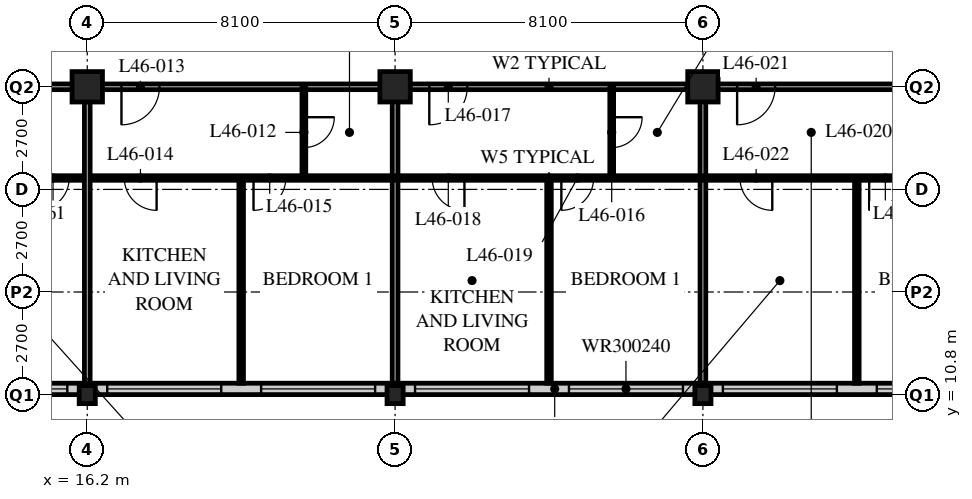
"""IFC4 building model, lengths in metres.
Left out: names, types, materials, properties, quantities, classifications, styles, units other than length and angle.
Written with IfcOpenShell. Run it as: python <this file> out.ifc"""

import sys

from ifc_helpers import new_model, si_unit, direction, frame, frame_2d, origin, origin_2d, place, context, subcontext, project, spatial, rectangle, hollow_rectangle, i_section, extrude, element, fill, save


model = new_model("IFC4")
c1 = context("Model", 3, precision=1e-05, world=origin(), true_north=direction((0.0, 1.0)))
c2 = subcontext(c1, "Body", "Model", "MODEL_VIEW")
j1 = project(units=[si_unit("LENGTHUNIT", "METRE"), si_unit("PLANEANGLEUNIT", "RADIAN")], contexts=[c1])
p1 = place(None, origin())
s1 = spatial("IfcSite", under=j1, at=p1, CompositionType="ELEMENT")
p2 = place(p1, origin())
s2 = spatial("IfcBuilding", under=s1, at=p2, CompositionType="ELEMENT")
p3 = place(p2, frame((0.0, 0.0, 181.2)))
s3 = spatial("IfcBuildingStorey", under=s2, at=p3, CompositionType="ELEMENT", Elevation=181.2)
p4 = place(p3, frame((16.2, 10.8, 0.0), z_axis=(0.0, 0.0, 1.0), x_axis=(1.0, 0.0, 0.0)))
e1 = element("IfcColumn", 1, at=p4, inside=s3, PredefinedType="COLUMN", context=c2, shape_type="SweptSolid", body=[
    extrude(i_section(OverallWidth=0.424, OverallDepth=0.475, WebThickness=0.048, FlangeThickness=0.077, FilletRadius=0.015, at=origin_2d()), origin(), (0.0, 0.0, 1.0), 3.6),
])
p5 = place(p3, frame((16.2, 18.9, 0.0), z_axis=(0.0, 0.0, 1.0), x_axis=(1.0, 0.0, 0.0)))
e2 = element("IfcColumn", 2, at=p5, inside=s3, PredefinedType="COLUMN", context=c2, shape_type="SweptSolid", body=[
    extrude(hollow_rectangle(XDim=0.8, YDim=0.8, WallThickness=0.08, at=origin_2d()), origin(), (0.0, 0.0, 1.0), 3.6),
])
p6 = place(p3, frame((24.3, 10.8, 0.0), z_axis=(0.0, 0.0, 1.0), x_axis=(1.0, 0.0, 0.0)))
e3 = element("IfcColumn", 3, at=p6, inside=s3, PredefinedType="COLUMN", context=c2, shape_type="SweptSolid", body=[
    extrude(i_section(OverallWidth=0.424, OverallDepth=0.475, WebThickness=0.048, FlangeThickness=0.077, FilletRadius=0.015, at=origin_2d()), origin(), (0.0, 0.0, 1.0), 3.6),
])
p7 = place(p3, frame((24.3, 18.9, 0.0), z_axis=(0.0, 0.0, 1.0), x_axis=(1.0, 0.0, 0.0)))
e4 = element("IfcColumn", 4, at=p7, inside=s3, PredefinedType="COLUMN", context=c2, shape_type="SweptSolid", body=[
    extrude(hollow_rectangle(XDim=0.8, YDim=0.8, WallThickness=0.08, at=origin_2d()), origin(), (0.0, 0.0, 1.0), 3.6),
])
p8 = place(p3, frame((32.4, 10.8, 0.0), z_axis=(0.0, 0.0, 1.0), x_axis=(1.0, 0.0, 0.0)))
e5 = element("IfcColumn", 5, at=p8, inside=s3, PredefinedType="COLUMN", context=c2, shape_type="SweptSolid", body=[
    extrude(i_section(OverallWidth=0.424, OverallDepth=0.475, WebThickness=0.048, FlangeThickness=0.077, FilletRadius=0.015, at=origin_2d()), origin(), (0.0, 0.0, 1.0), 3.6),
])
p9 = place(p3, frame((32.4, 18.9, 0.0), z_axis=(0.0, 0.0, 1.0), x_axis=(1.0, 0.0, 0.0)))
e6 = element("IfcColumn", 6, at=p9, inside=s3, PredefinedType="COLUMN", context=c2, shape_type="SweptSolid", body=[
    extrude(hollow_rectangle(XDim=0.8, YDim=0.8, WallThickness=0.08, at=origin_2d()), origin(), (0.0, 0.0, 1.0), 3.6),
])
p10 = place(p3, frame((8.4, 10.95, 0.0), z_axis=(0.0, 0.0, 1.0), x_axis=(1.0, 0.0, 0.0)))
e7 = element("IfcWall", 7, at=p10, inside=s3, PredefinedType="SOLIDWALL", context=c2, shape_type="SweptSolid", body=[
    extrude(rectangle(XDim=40.2, YDim=0.3, at=frame_2d((20.1, 0.0))), origin(), (0.0, 0.0, 1.0), 3.39),
])
p11 = place(p10, frame((0.225, 0.0, 0.6)))
e8 = element("IfcOpeningElement", 8, at=p11, cuts=e7, PredefinedType="OPENING", context=c2, shape_type="SweptSolid", body=[
    extrude(rectangle(XDim=3.0, YDim=2.4, at=frame_2d((1.5, 1.2))), frame((0.0, 0.16, 0.0), z_axis=(0.0, -1.0, 0.0), x_axis=(1.0, 0.0, 0.0)), (0.0, 0.0, 1.0), 0.32),
])
p12 = place(p10, frame((4.275, 0.0, 0.6)))
e9 = element("IfcOpeningElement", 9, at=p12, cuts=e7, PredefinedType="OPENING", context=c2, shape_type="SweptSolid", body=[
    extrude(rectangle(XDim=3.0, YDim=2.4, at=frame_2d((1.5, 1.2))), frame((0.0, 0.16, 0.0), z_axis=(0.0, -1.0, 0.0), x_axis=(1.0, 0.0, 0.0)), (0.0, 0.0, 1.0), 0.32),
])
p13 = place(p10, frame((8.325, 0.0, 0.6)))
e10 = element("IfcOpeningElement", 10, at=p13, cuts=e7, PredefinedType="OPENING", context=c2, shape_type="SweptSolid", body=[
    extrude(rectangle(XDim=3.0, YDim=2.4, at=frame_2d((1.5, 1.2))), frame((0.0, 0.16, 0.0), z_axis=(0.0, -1.0, 0.0), x_axis=(1.0, 0.0, 0.0)), (0.0, 0.0, 1.0), 0.32),
])
p14 = place(p10, frame((12.375, 0.0, 0.6)))
e11 = element("IfcOpeningElement", 11, at=p14, cuts=e7, PredefinedType="OPENING", context=c2, shape_type="SweptSolid", body=[
    extrude(rectangle(XDim=3.0, YDim=2.4, at=frame_2d((1.5, 1.2))), frame((0.0, 0.16, 0.0), z_axis=(0.0, -1.0, 0.0), x_axis=(1.0, 0.0, 0.0)), (0.0, 0.0, 1.0), 0.32),
])
p15 = place(p10, frame((16.425, 0.0, 0.6)))
e12 = element("IfcOpeningElement", 12, at=p15, cuts=e7, PredefinedType="OPENING", context=c2, shape_type="SweptSolid", body=[
    extrude(rectangle(XDim=3.0, YDim=2.4, at=frame_2d((1.5, 1.2))), frame((0.0, 0.16, 0.0), z_axis=(0.0, -1.0, 0.0), x_axis=(1.0, 0.0, 0.0)), (0.0, 0.0, 1.0), 0.32),
])
p16 = place(p10, frame((20.475, 0.0, 0.6)))
e13 = element("IfcOpeningElement", 13, at=p16, cuts=e7, PredefinedType="OPENING", context=c2, shape_type="SweptSolid", body=[
    extrude(rectangle(XDim=3.0, YDim=2.4, at=frame_2d((1.5, 1.2))), frame((0.0, 0.16, 0.0), z_axis=(0.0, -1.0, 0.0), x_axis=(1.0, 0.0, 0.0)), (0.0, 0.0, 1.0), 0.32),
])
p17 = place(p10, frame((24.525, 0.0, 0.6)))
e14 = element("IfcOpeningElement", 14, at=p17, cuts=e7, PredefinedType="OPENING", context=c2, shape_type="SweptSolid", body=[
    extrude(rectangle(XDim=3.0, YDim=2.4, at=frame_2d((1.5, 1.2))), frame((0.0, 0.16, 0.0), z_axis=(0.0, -1.0, 0.0), x_axis=(1.0, 0.0, 0.0)), (0.0, 0.0, 1.0), 0.32),
])
p18 = place(p10, frame((28.575, 0.0, 0.6)))
e15 = element("IfcOpeningElement", 15, at=p18, cuts=e7, PredefinedType="OPENING", context=c2, shape_type="SweptSolid", body=[
    extrude(rectangle(XDim=3.0, YDim=2.4, at=frame_2d((1.5, 1.2))), frame((0.0, 0.16, 0.0), z_axis=(0.0, -1.0, 0.0), x_axis=(1.0, 0.0, 0.0)), (0.0, 0.0, 1.0), 0.32),
])
p19 = place(p10, frame((32.625, 0.0, 0.6)))
e16 = element("IfcOpeningElement", 16, at=p19, cuts=e7, PredefinedType="OPENING", context=c2, shape_type="SweptSolid", body=[
    extrude(rectangle(XDim=3.0, YDim=2.4, at=frame_2d((1.5, 1.2))), frame((0.0, 0.16, 0.0), z_axis=(0.0, -1.0, 0.0), x_axis=(1.0, 0.0, 0.0)), (0.0, 0.0, 1.0), 0.32),
])
p20 = place(p10, frame((36.675, 0.0, 0.6)))
e17 = element("IfcOpeningElement", 17, at=p20, cuts=e7, PredefinedType="OPENING", context=c2, shape_type="SweptSolid", body=[
    extrude(rectangle(XDim=3.0, YDim=2.4, at=frame_2d((1.5, 1.2))), frame((0.0, 0.16, 0.0), z_axis=(0.0, -1.0, 0.0), x_axis=(1.0, 0.0, 0.0)), (0.0, 0.0, 1.0), 0.32),
])
p21 = place(p3, frame((12.15, 18.9, 0.0), z_axis=(0.0, 0.0, 1.0), x_axis=(1.0, 0.0, 0.0)))
e18 = element("IfcWall", 18, at=p21, inside=s3, PredefinedType="PARTITIONING", context=c2, shape_type="SweptSolid", body=[
    extrude(rectangle(XDim=32.4, YDim=0.15, at=frame_2d((16.2, 0.0))), origin(), (0.0, 0.0, 1.0), 2.778),
])
p22 = place(p21, frame((4.95, 0.0, 0.0)))
e19 = element("IfcOpeningElement", 19, at=p22, cuts=e18, PredefinedType="OPENING", context=c2, shape_type="SweptSolid", body=[
    extrude(rectangle(XDim=1.0, YDim=2.1, at=frame_2d((0.5, 1.05))), frame((0.0, 0.085, 0.0), z_axis=(0.0, -1.0, 0.0), x_axis=(1.0, 0.0, 0.0)), (0.0, 0.0, 1.0), 0.17),
])
p23 = place(p21, frame((13.05, 0.0, 0.0)))
e20 = element("IfcOpeningElement", 20, at=p23, cuts=e18, PredefinedType="OPENING", context=c2, shape_type="SweptSolid", body=[
    extrude(rectangle(XDim=1.0, YDim=2.1, at=frame_2d((0.5, 1.05))), frame((0.0, 0.085, 0.0), z_axis=(0.0, -1.0, 0.0), x_axis=(1.0, 0.0, 0.0)), (0.0, 0.0, 1.0), 0.17),
])
p24 = place(p21, frame((21.15, 0.0, 0.0)))
e21 = element("IfcOpeningElement", 21, at=p24, cuts=e18, PredefinedType="OPENING", context=c2, shape_type="SweptSolid", body=[
    extrude(rectangle(XDim=1.0, YDim=2.1, at=frame_2d((0.5, 1.05))), frame((0.0, 0.085, 0.0), z_axis=(0.0, -1.0, 0.0), x_axis=(1.0, 0.0, 0.0)), (0.0, 0.0, 1.0), 0.17),
])
p25 = place(p21, frame((1.525, 0.0, 0.0)))
e22 = element("IfcOpeningElement", 22, at=p25, cuts=e18, PredefinedType="OPENING", context=c2, shape_type="SweptSolid", body=[
    extrude(rectangle(XDim=1.0, YDim=2.1, at=frame_2d((0.5, 1.05))), frame((0.0, 0.085, 0.0), z_axis=(0.0, -1.0, 0.0), x_axis=(1.0, 0.0, 0.0)), (0.0, 0.0, 1.0), 0.17),
])
p26 = place(p21, frame((29.875, 0.0, 0.0)))
e23 = element("IfcOpeningElement", 23, at=p26, cuts=e18, PredefinedType="OPENING", context=c2, shape_type="SweptSolid", body=[
    extrude(rectangle(XDim=1.0, YDim=2.1, at=frame_2d((0.5, 1.05))), frame((0.0, 0.085, 0.0), z_axis=(0.0, -1.0, 0.0), x_axis=(1.0, 0.0, 0.0)), (0.0, 0.0, 1.0), 0.17),
])
p27 = place(p3, frame((21.9, 18.9, 0.0), z_axis=(0.0, 0.0, 1.0), x_axis=(0.0, -1.0, 0.0)))
e24 = element("IfcWall", 24, at=p27, inside=s3, PredefinedType="PARTITIONING", context=c2, shape_type="SweptSolid", body=[
    extrude(rectangle(XDim=2.4, YDim=0.1, at=frame_2d((1.2, 0.0))), origin(), (0.0, 0.0, 1.0), 3.39),
])
p28 = place(p27, frame((0.8, 0.0, 0.0)))
e25 = element("IfcOpeningElement", 25, at=p28, cuts=e24, PredefinedType="OPENING", context=c2, shape_type="SweptSolid", body=[
    extrude(rectangle(XDim=0.8, YDim=2.1, at=frame_2d((0.4, 1.05))), frame((0.0, 0.06, 0.0), z_axis=(0.0, -1.0, 0.0), x_axis=(1.0, 0.0, 0.0)), (0.0, 0.0, 1.0), 0.12),
])
p29 = place(p3, frame((20.25, 16.5, 0.0), z_axis=(0.0, 0.0, 1.0), x_axis=(0.0, -1.0, 0.0)))
e26 = element("IfcWall", 26, at=p29, inside=s3, PredefinedType="PARTITIONING", context=c2, shape_type="SweptSolid", body=[
    extrude(rectangle(XDim=5.4, YDim=0.12, at=frame_2d((2.7, 0.0))), origin(), (0.0, 0.0, 1.0), 3.39),
])
p30 = place(p3, frame((24.3, 18.9, 0.0), z_axis=(0.0, 0.0, 1.0), x_axis=(0.0, -1.0, 0.0)))
e27 = element("IfcWall", 27, at=p30, inside=s3, PredefinedType="PARTITIONING", context=c2, shape_type="SweptSolid", body=[
    extrude(rectangle(XDim=7.8, YDim=0.15, at=frame_2d((3.9, 0.0))), origin(), (0.0, 0.0, 1.0), 2.778),
])
p31 = place(p3, frame((30.0, 18.9, 0.0), z_axis=(0.0, 0.0, 1.0), x_axis=(0.0, -1.0, 0.0)))
e28 = element("IfcWall", 28, at=p31, inside=s3, PredefinedType="PARTITIONING", context=c2, shape_type="SweptSolid", body=[
    extrude(rectangle(XDim=2.4, YDim=0.1, at=frame_2d((1.2, 0.0))), origin(), (0.0, 0.0, 1.0), 3.39),
])
p32 = place(p31, frame((0.8, 0.0, 0.0)))
e29 = element("IfcOpeningElement", 29, at=p32, cuts=e28, PredefinedType="OPENING", context=c2, shape_type="SweptSolid", body=[
    extrude(rectangle(XDim=0.8, YDim=2.1, at=frame_2d((0.4, 1.05))), frame((0.0, 0.06, 0.0), z_axis=(0.0, -1.0, 0.0), x_axis=(1.0, 0.0, 0.0)), (0.0, 0.0, 1.0), 0.12),
])
p33 = place(p3, frame((28.35, 16.5, 0.0), z_axis=(0.0, 0.0, 1.0), x_axis=(0.0, -1.0, 0.0)))
e30 = element("IfcWall", 30, at=p33, inside=s3, PredefinedType="PARTITIONING", context=c2, shape_type="SweptSolid", body=[
    extrude(rectangle(XDim=5.4, YDim=0.12, at=frame_2d((2.7, 0.0))), origin(), (0.0, 0.0, 1.0), 3.39),
])
p34 = place(p3, frame((32.4, 18.9, 0.0), z_axis=(0.0, 0.0, 1.0), x_axis=(0.0, -1.0, 0.0)))
e31 = element("IfcWall", 31, at=p34, inside=s3, PredefinedType="PARTITIONING", context=c2, shape_type="SweptSolid", body=[
    extrude(rectangle(XDim=7.8, YDim=0.15, at=frame_2d((3.9, 0.0))), origin(), (0.0, 0.0, 1.0), 2.778),
])
p35 = place(p3, frame((36.45, 16.5, 0.0), z_axis=(0.0, 0.0, 1.0), x_axis=(0.0, -1.0, 0.0)))
e32 = element("IfcWall", 32, at=p35, inside=s3, PredefinedType="PARTITIONING", context=c2, shape_type="SweptSolid", body=[
    extrude(rectangle(XDim=5.4, YDim=0.12, at=frame_2d((2.7, 0.0))), origin(), (0.0, 0.0, 1.0), 3.39),
])
p36 = place(p3, frame((8.15, 16.5, 0.0), z_axis=(0.0, 0.0, 1.0), x_axis=(1.0, 0.0, 0.0)))
e33 = element("IfcWall", 33, at=p36, inside=s3, PredefinedType="PARTITIONING", context=c2, shape_type="SweptSolid", body=[
    extrude(rectangle(XDim=40.4, YDim=0.12, at=frame_2d((20.2, 0.0))), origin(), (0.0, 0.0, 1.0), 3.39),
])
p37 = place(p36, frame((9.025, 0.0, 0.0)))
e34 = element("IfcOpeningElement", 34, at=p37, cuts=e33, PredefinedType="OPENING", context=c2, shape_type="SweptSolid", body=[
    extrude(rectangle(XDim=0.85, YDim=2.1, at=frame_2d((0.425, 1.05))), frame((0.0, 0.07, 0.0), z_axis=(0.0, -1.0, 0.0), x_axis=(1.0, 0.0, 0.0)), (0.0, 0.0, 1.0), 0.14),
])
p38 = place(p36, frame((12.425, 0.0, 0.0)))
e35 = element("IfcOpeningElement", 35, at=p38, cuts=e33, PredefinedType="OPENING", context=c2, shape_type="SweptSolid", body=[
    extrude(rectangle(XDim=0.85, YDim=2.1, at=frame_2d((0.425, 1.05))), frame((0.0, 0.07, 0.0), z_axis=(0.0, -1.0, 0.0), x_axis=(1.0, 0.0, 0.0)), (0.0, 0.0, 1.0), 0.14),
])
p39 = place(p36, frame((17.125, 0.0, 0.0)))
e36 = element("IfcOpeningElement", 36, at=p39, cuts=e33, PredefinedType="OPENING", context=c2, shape_type="SweptSolid", body=[
    extrude(rectangle(XDim=0.85, YDim=2.1, at=frame_2d((0.425, 1.05))), frame((0.0, 0.07, 0.0), z_axis=(0.0, -1.0, 0.0), x_axis=(1.0, 0.0, 0.0)), (0.0, 0.0, 1.0), 0.14),
])
p40 = place(p36, frame((20.525, 0.0, 0.0)))
e37 = element("IfcOpeningElement", 37, at=p40, cuts=e33, PredefinedType="OPENING", context=c2, shape_type="SweptSolid", body=[
    extrude(rectangle(XDim=0.85, YDim=2.1, at=frame_2d((0.425, 1.05))), frame((0.0, 0.07, 0.0), z_axis=(0.0, -1.0, 0.0), x_axis=(1.0, 0.0, 0.0)), (0.0, 0.0, 1.0), 0.14),
])
p41 = place(p36, frame((25.225, 0.0, 0.0)))
e38 = element("IfcOpeningElement", 38, at=p41, cuts=e33, PredefinedType="OPENING", context=c2, shape_type="SweptSolid", body=[
    extrude(rectangle(XDim=0.85, YDim=2.1, at=frame_2d((0.425, 1.05))), frame((0.0, 0.07, 0.0), z_axis=(0.0, -1.0, 0.0), x_axis=(1.0, 0.0, 0.0)), (0.0, 0.0, 1.0), 0.14),
])
p42 = place(p36, frame((28.625, 0.0, 0.0)))
e39 = element("IfcOpeningElement", 39, at=p42, cuts=e33, PredefinedType="OPENING", context=c2, shape_type="SweptSolid", body=[
    extrude(rectangle(XDim=0.85, YDim=2.1, at=frame_2d((0.425, 1.05))), frame((0.0, 0.07, 0.0), z_axis=(0.0, -1.0, 0.0), x_axis=(1.0, 0.0, 0.0)), (0.0, 0.0, 1.0), 0.14),
])
p43 = place(p36, frame((6.725, 0.0, 0.0)))
e40 = element("IfcOpeningElement", 40, at=p43, cuts=e33, PredefinedType="OPENING", context=c2, shape_type="SweptSolid", body=[
    extrude(rectangle(XDim=0.85, YDim=2.1, at=frame_2d((0.425, 1.05))), frame((0.0, 0.07, 0.0), z_axis=(0.0, -1.0, 0.0), x_axis=(1.0, 0.0, 0.0)), (0.0, 0.0, 1.0), 0.14),
])
p44 = place(p36, frame((2.875, 0.0, 0.0)))
e41 = element("IfcOpeningElement", 41, at=p44, cuts=e33, PredefinedType="OPENING", context=c2, shape_type="SweptSolid", body=[
    extrude(rectangle(XDim=0.85, YDim=2.1, at=frame_2d((0.425, 1.05))), frame((0.0, 0.07, 0.0), z_axis=(0.0, -1.0, 0.0), x_axis=(1.0, 0.0, 0.0)), (0.0, 0.0, 1.0), 0.14),
])
p45 = place(p36, frame((32.825, 0.0, 0.0)))
e42 = element("IfcOpeningElement", 42, at=p45, cuts=e33, PredefinedType="OPENING", context=c2, shape_type="SweptSolid", body=[
    extrude(rectangle(XDim=0.85, YDim=2.1, at=frame_2d((0.425, 1.05))), frame((0.0, 0.07, 0.0), z_axis=(0.0, -1.0, 0.0), x_axis=(1.0, 0.0, 0.0)), (0.0, 0.0, 1.0), 0.14),
])
p46 = place(p36, frame((36.675, 0.0, 0.0)))
e43 = element("IfcOpeningElement", 43, at=p46, cuts=e33, PredefinedType="OPENING", context=c2, shape_type="SweptSolid", body=[
    extrude(rectangle(XDim=0.85, YDim=2.1, at=frame_2d((0.425, 1.05))), frame((0.0, 0.07, 0.0), z_axis=(0.0, -1.0, 0.0), x_axis=(1.0, 0.0, 0.0)), (0.0, 0.0, 1.0), 0.14),
])
p47 = place(p3, frame((16.2, 18.9, 0.0), z_axis=(0.0, 0.0, 1.0), x_axis=(0.0, -1.0, 0.0)))
e44 = element("IfcWall", 44, at=p47, inside=s3, PredefinedType="PARTITIONING", context=c2, shape_type="SweptSolid", body=[
    extrude(rectangle(XDim=7.8, YDim=0.15, at=frame_2d((3.9, 0.0))), origin(), (0.0, 0.0, 1.0), 2.778),
])
p48 = place(p12, origin())
e45 = element("IfcWindow", 45, at=p48, inside=s3, PartitioningType="SINGLE_PANEL", PredefinedType="WINDOW", context=c2, shape_type="SweptSolid", body=[
    extrude(rectangle(XDim=3.0, YDim=2.4, at=frame_2d((1.5, 1.2))), frame((0.0, 0.03, 0.0), z_axis=(0.0, -1.0, 0.0), x_axis=(1.0, 0.0, 0.0)), (0.0, 0.0, 1.0), 0.06),
])
fill(e9, e45)
p49 = place(p13, origin())
e46 = element("IfcWindow", 46, at=p49, inside=s3, PartitioningType="SINGLE_PANEL", PredefinedType="WINDOW", context=c2, shape_type="SweptSolid", body=[
    extrude(rectangle(XDim=3.0, YDim=2.4, at=frame_2d((1.5, 1.2))), frame((0.0, 0.03, 0.0), z_axis=(0.0, -1.0, 0.0), x_axis=(1.0, 0.0, 0.0)), (0.0, 0.0, 1.0), 0.06),
])
fill(e10, e46)
p50 = place(p14, origin())
e47 = element("IfcWindow", 47, at=p50, inside=s3, PartitioningType="SINGLE_PANEL", PredefinedType="WINDOW", context=c2, shape_type="SweptSolid", body=[
    extrude(rectangle(XDim=3.0, YDim=2.4, at=frame_2d((1.5, 1.2))), frame((0.0, 0.03, 0.0), z_axis=(0.0, -1.0, 0.0), x_axis=(1.0, 0.0, 0.0)), (0.0, 0.0, 1.0), 0.06),
])
fill(e11, e47)
p51 = place(p15, origin())
e48 = element("IfcWindow", 48, at=p51, inside=s3, PartitioningType="SINGLE_PANEL", PredefinedType="WINDOW", context=c2, shape_type="SweptSolid", body=[
    extrude(rectangle(XDim=3.0, YDim=2.4, at=frame_2d((1.5, 1.2))), frame((0.0, 0.03, 0.0), z_axis=(0.0, -1.0, 0.0), x_axis=(1.0, 0.0, 0.0)), (0.0, 0.0, 1.0), 0.06),
])
fill(e12, e48)
p52 = place(p16, origin())
e49 = element("IfcWindow", 49, at=p52, inside=s3, PartitioningType="SINGLE_PANEL", PredefinedType="WINDOW", context=c2, shape_type="SweptSolid", body=[
    extrude(rectangle(XDim=3.0, YDim=2.4, at=frame_2d((1.5, 1.2))), frame((0.0, 0.03, 0.0), z_axis=(0.0, -1.0, 0.0), x_axis=(1.0, 0.0, 0.0)), (0.0, 0.0, 1.0), 0.06),
])
fill(e13, e49)
p53 = place(p17, origin())
e50 = element("IfcWindow", 50, at=p53, inside=s3, PartitioningType="SINGLE_PANEL", PredefinedType="WINDOW", context=c2, shape_type="SweptSolid", body=[
    extrude(rectangle(XDim=3.0, YDim=2.4, at=frame_2d((1.5, 1.2))), frame((0.0, 0.03, 0.0), z_axis=(0.0, -1.0, 0.0), x_axis=(1.0, 0.0, 0.0)), (0.0, 0.0, 1.0), 0.06),
])
fill(e14, e50)
p54 = place(p18, origin())
e51 = element("IfcWindow", 51, at=p54, inside=s3, PartitioningType="SINGLE_PANEL", PredefinedType="WINDOW", context=c2, shape_type="SweptSolid", body=[
    extrude(rectangle(XDim=3.0, YDim=2.4, at=frame_2d((1.5, 1.2))), frame((0.0, 0.03, 0.0), z_axis=(0.0, -1.0, 0.0), x_axis=(1.0, 0.0, 0.0)), (0.0, 0.0, 1.0), 0.06),
])
fill(e15, e51)
p55 = place(p28, origin())
e52 = element("IfcDoor", 52, at=p55, inside=s3, OperationType="SINGLE_SWING_LEFT", PredefinedType="DOOR", context=c2, shape_type="SweptSolid", body=[
    extrude(rectangle(XDim=0.8, YDim=2.1, at=frame_2d((0.4, 1.05))), frame((0.0, 0.025, 0.0), z_axis=(0.0, -1.0, 0.0), x_axis=(1.0, 0.0, 0.0)), (0.0, 0.0, 1.0), 0.05),
])
fill(e25, e52)
p56 = place(p22, origin())
e53 = element("IfcDoor", 53, at=p56, inside=s3, OperationType="SINGLE_SWING_RIGHT", PredefinedType="DOOR", context=c2, shape_type="SweptSolid", body=[
    extrude(rectangle(XDim=1.0, YDim=2.1, at=frame_2d((0.5, 1.05))), frame((0.0, 0.025, 0.0), z_axis=(0.0, -1.0, 0.0), x_axis=(1.0, 0.0, 0.0)), (0.0, 0.0, 1.0), 0.05),
])
fill(e19, e53)
p57 = place(p37, origin())
e54 = element("IfcDoor", 54, at=p57, inside=s3, OperationType="SINGLE_SWING_LEFT", PredefinedType="DOOR", context=c2, shape_type="SweptSolid", body=[
    extrude(rectangle(XDim=0.85, YDim=2.1, at=frame_2d((0.425, 1.05))), frame((0.0, 0.025, 0.0), z_axis=(0.0, -1.0, 0.0), x_axis=(1.0, 0.0, 0.0)), (0.0, 0.0, 1.0), 0.05),
])
fill(e34, e54)
p58 = place(p38, origin())
e55 = element("IfcDoor", 55, at=p58, inside=s3, OperationType="SINGLE_SWING_RIGHT", PredefinedType="DOOR", context=c2, shape_type="SweptSolid", body=[
    extrude(rectangle(XDim=0.85, YDim=2.1, at=frame_2d((0.425, 1.05))), frame((0.0, 0.025, 0.0), z_axis=(0.0, -1.0, 0.0), x_axis=(1.0, 0.0, 0.0)), (0.0, 0.0, 1.0), 0.05),
])
fill(e35, e55)
p59 = place(p32, origin())
e56 = element("IfcDoor", 56, at=p59, inside=s3, OperationType="SINGLE_SWING_LEFT", PredefinedType="DOOR", context=c2, shape_type="SweptSolid", body=[
    extrude(rectangle(XDim=0.8, YDim=2.1, at=frame_2d((0.4, 1.05))), frame((0.0, 0.025, 0.0), z_axis=(0.0, -1.0, 0.0), x_axis=(1.0, 0.0, 0.0)), (0.0, 0.0, 1.0), 0.05),
])
fill(e29, e56)
p60 = place(p23, origin())
e57 = element("IfcDoor", 57, at=p60, inside=s3, OperationType="SINGLE_SWING_RIGHT", PredefinedType="DOOR", context=c2, shape_type="SweptSolid", body=[
    extrude(rectangle(XDim=1.0, YDim=2.1, at=frame_2d((0.5, 1.05))), frame((0.0, 0.025, 0.0), z_axis=(0.0, -1.0, 0.0), x_axis=(1.0, 0.0, 0.0)), (0.0, 0.0, 1.0), 0.05),
])
fill(e20, e57)
p61 = place(p39, origin())
e58 = element("IfcDoor", 58, at=p61, inside=s3, OperationType="SINGLE_SWING_LEFT", PredefinedType="DOOR", context=c2, shape_type="SweptSolid", body=[
    extrude(rectangle(XDim=0.85, YDim=2.1, at=frame_2d((0.425, 1.05))), frame((0.0, 0.025, 0.0), z_axis=(0.0, -1.0, 0.0), x_axis=(1.0, 0.0, 0.0)), (0.0, 0.0, 1.0), 0.05),
])
fill(e36, e58)
p62 = place(p40, origin())
e59 = element("IfcDoor", 59, at=p62, inside=s3, OperationType="SINGLE_SWING_RIGHT", PredefinedType="DOOR", context=c2, shape_type="SweptSolid", body=[
    extrude(rectangle(XDim=0.85, YDim=2.1, at=frame_2d((0.425, 1.05))), frame((0.0, 0.025, 0.0), z_axis=(0.0, -1.0, 0.0), x_axis=(1.0, 0.0, 0.0)), (0.0, 0.0, 1.0), 0.05),
])
fill(e37, e59)
p63 = place(p24, origin())
e60 = element("IfcDoor", 60, at=p63, inside=s3, OperationType="SINGLE_SWING_RIGHT", PredefinedType="DOOR", context=c2, shape_type="SweptSolid", body=[
    extrude(rectangle(XDim=1.0, YDim=2.1, at=frame_2d((0.5, 1.05))), frame((0.0, 0.025, 0.0), z_axis=(0.0, -1.0, 0.0), x_axis=(1.0, 0.0, 0.0)), (0.0, 0.0, 1.0), 0.05),
])
fill(e21, e60)
p64 = place(p41, origin())
e61 = element("IfcDoor", 61, at=p64, inside=s3, OperationType="SINGLE_SWING_LEFT", PredefinedType="DOOR", context=c2, shape_type="SweptSolid", body=[
    extrude(rectangle(XDim=0.85, YDim=2.1, at=frame_2d((0.425, 1.05))), frame((0.0, 0.025, 0.0), z_axis=(0.0, -1.0, 0.0), x_axis=(1.0, 0.0, 0.0)), (0.0, 0.0, 1.0), 0.05),
])
fill(e38, e61)
p65 = place(p42, origin())
e62 = element("IfcDoor", 62, at=p65, inside=s3, OperationType="SINGLE_SWING_RIGHT", PredefinedType="DOOR", context=c2, shape_type="SweptSolid", body=[
    extrude(rectangle(XDim=0.85, YDim=2.1, at=frame_2d((0.425, 1.05))), frame((0.0, 0.025, 0.0), z_axis=(0.0, -1.0, 0.0), x_axis=(1.0, 0.0, 0.0)), (0.0, 0.0, 1.0), 0.05),
])
fill(e39, e62)
p66 = place(p43, origin())
e63 = element("IfcDoor", 63, at=p66, inside=s3, OperationType="SINGLE_SWING_RIGHT", PredefinedType="DOOR", context=c2, shape_type="SweptSolid", body=[
    extrude(rectangle(XDim=0.85, YDim=2.1, at=frame_2d((0.425, 1.05))), frame((0.0, 0.025, 0.0), z_axis=(0.0, -1.0, 0.0), x_axis=(1.0, 0.0, 0.0)), (0.0, 0.0, 1.0), 0.05),
])
fill(e40, e63)
save(model, sys.argv[1])
